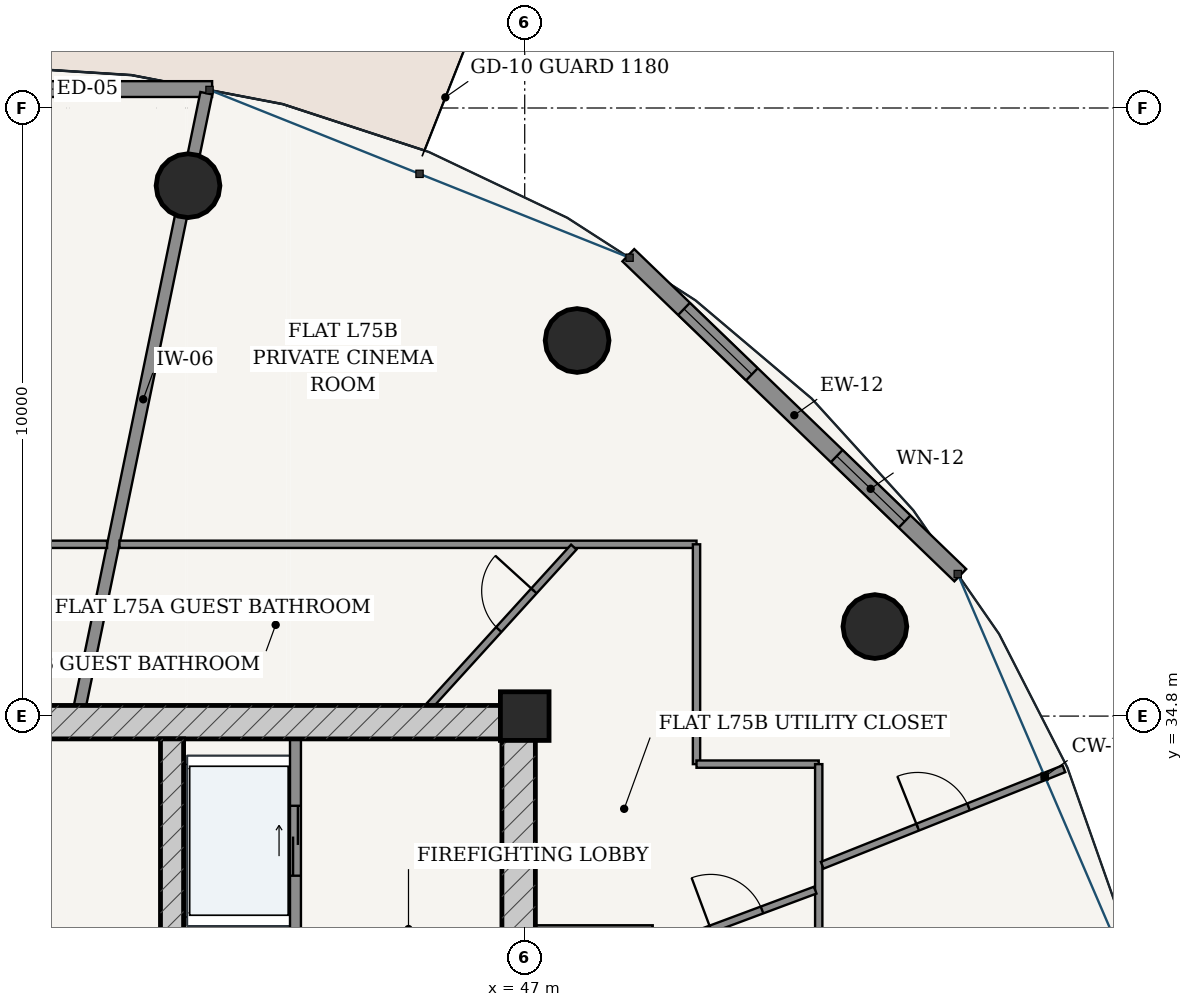
"""IFC4 building model, lengths in metres.
Left out: names, types, materials, properties, quantities, classifications, styles, units other than length and angle.
Written with IfcOpenShell. Run it as: python <this file> out.ifc"""

import sys

from ifc_helpers import new_model, si_unit, direction, frame, frame_2d, origin, origin_2d, place, context, subcontext, project, spatial, rectangle, hollow_circle, extrude, source, transform, mapped, element, fill, save


model = new_model("IFC4")
c1 = context("Model", 3, precision=1e-05, world=origin(), true_north=direction((-0.2419218956, 0.970295726276)))
c2 = subcontext(c1, "Body", "Model", "MODEL_VIEW")
j1 = project(units=[si_unit("LENGTHUNIT", "METRE"), si_unit("PLANEANGLEUNIT", "RADIAN")], contexts=[c1])
p1 = place(None, origin())
s1 = spatial("IfcSite", under=j1, at=p1, CompositionType="ELEMENT")
p2 = place(p1, origin())
s2 = spatial("IfcBuilding", under=s1, at=p2, CompositionType="ELEMENT")
p3 = place(p2, frame((0.0, 0.0, 285.7)))
s3 = spatial("IfcBuildingStorey", under=s2, at=p3, CompositionType="ELEMENT", Elevation=285.7)
p4 = place(p3, frame((47.0, 34.8, 0.0), z_axis=(0.0, 0.0, 1.0), x_axis=(1.0, 0.0, 0.0)))
e1 = element("IfcColumn", 1, at=p4, inside=s3, PredefinedType="COLUMN", context=c2, shape_type="SweptSolid", body=[
    extrude(rectangle(XDim=0.8, YDim=0.8, at=origin_2d()), origin(), (0.0, 0.0, 1.0), 3.75),
])
p5 = place(p3, frame((28.825, 34.7, 0.0), z_axis=(0.0, 0.0, 1.0), x_axis=(1.0, 0.0, 0.0)))
e2 = element("IfcWall", 2, at=p5, inside=s3, PredefinedType="SHEAR", context=c2, shape_type="SweptSolid", body=[
    extrude(rectangle(XDim=18.35, YDim=0.55, at=frame_2d((9.175, 0.0))), origin(), (0.0, 0.0, 1.0), 3.49),
])
p6 = place(p3, frame((46.9, 19.175, 0.0), z_axis=(0.0, 0.0, 1.0), x_axis=(0.0, 1.0, 0.0)))
e3 = element("IfcWall", 3, at=p6, inside=s3, PredefinedType="SHEAR", context=c2, shape_type="SweptSolid", body=[
    extrude(rectangle(XDim=15.25, YDim=0.55, at=frame_2d((7.625, 0.0))), origin(), (0.0, 0.0, 1.0), 3.49),
])
p7 = place(p6, frame((9.875, 0.0, 0.0)))
e4 = element("IfcOpeningElement", 4, at=p7, cuts=e3, PredefinedType="OPENING", context=c2, shape_type="SweptSolid", body=[
    extrude(rectangle(XDim=1.5, YDim=2.2, at=frame_2d((0.75, 1.1))), frame((0.0, 0.285, 0.0), z_axis=(0.0, -1.0, 0.0), x_axis=(1.0, 0.0, 0.0)), (0.0, 0.0, 1.0), 0.57),
])
p8 = place(p3, frame((41.2, 19.175, 0.0), z_axis=(0.0, 0.0, 1.0), x_axis=(0.0, 1.0, 0.0)))
e5 = element("IfcWall", 5, at=p8, inside=s3, PredefinedType="SHEAR", context=c2, shape_type="SweptSolid", body=[
    extrude(rectangle(XDim=15.25, YDim=0.38, at=frame_2d((7.625, 0.0))), origin(), (0.0, 0.0, 1.0), 3.49),
])
p9 = place(p8, frame((7.8, 0.0, 0.0)))
e6 = element("IfcOpeningElement", 6, at=p9, cuts=e5, PredefinedType="OPENING", context=c2, shape_type="SweptSolid", body=[
    extrude(rectangle(XDim=1.05, YDim=2.15, at=frame_2d((0.525, 1.075))), frame((0.0, 0.2, 0.0), z_axis=(0.0, -1.0, 0.0), x_axis=(1.0, 0.0, 0.0)), (0.0, 0.0, 1.0), 0.4),
])
for number, where, z_axis, x_axis in (
    (7, (52.759, 36.272, 0.0), (0.0, 0.0, 1.0), (1.0, 0.0, 0.0)),
    (8, (47.861, 40.977, 0.0), (0.0, 0.0, 1.0), (1.0, 0.0, 0.0)),
    (9, (41.463, 43.522, 0.0), (0.0, 0.0, 1.0), (1.0, 0.0, 0.0)),
):
    element("IfcColumn", number, at=place(p3, frame(where, z_axis=z_axis, x_axis=x_axis)), inside=s3, PredefinedType="COLUMN", context=c2, shape_type="SweptSolid", body=[
        extrude(hollow_circle(Radius=0.525, WallThickness=0.035, at=origin_2d()), origin(), (0.0, 0.0, 1.0), 3.75),
    ])
p10 = place(p3, frame((54.163, 37.117, 0.0), z_axis=(0.0, 0.0, 1.0), x_axis=(-0.719979309073, 0.693995529169, 0.0)))
e10 = element("IfcWall", 10, at=p10, inside=s3, PredefinedType="SOLIDWALL", context=c2, shape_type="SweptSolid", body=[
    extrude(rectangle(XDim=7.583, YDim=0.28, at=frame_2d((3.791, 0.0))), origin(), (0.0, 0.0, 1.0), 3.49),
])
p11 = place(p10, frame((1.272, 0.0, 0.85)))
e11 = element("IfcOpeningElement", 11, at=p11, cuts=e10, PredefinedType="OPENING", context=c2, shape_type="SweptSolid", body=[
    extrude(rectangle(XDim=1.55, YDim=1.95, at=frame_2d((0.775, 0.975))), frame((0.0, 0.15, 0.0), z_axis=(0.0, -1.0, 0.0), x_axis=(1.0, 0.0, 0.0)), (0.0, 0.0, 1.0), 0.3),
])
p12 = place(p10, frame((4.76, 0.0, 0.85)))
e12 = element("IfcOpeningElement", 12, at=p12, cuts=e10, PredefinedType="OPENING", context=c2, shape_type="SweptSolid", body=[
    extrude(rectangle(XDim=1.55, YDim=1.95, at=frame_2d((0.775, 0.975))), frame((0.0, 0.15, 0.0), z_axis=(0.0, -1.0, 0.0), x_axis=(1.0, 0.0, 0.0)), (0.0, 0.0, 1.0), 0.3),
])
p13 = place(p3, frame((41.859, 45.111, 0.0), z_axis=(0.0, 0.0, 1.0), x_axis=(-1.0, 0.0, 0.0)))
e13 = element("IfcWall", 13, at=p13, inside=s3, PredefinedType="SOLIDWALL", context=c2, shape_type="SweptSolid", body=[
    extrude(rectangle(XDim=7.718, YDim=0.26, at=frame_2d((3.859, 0.0))), origin(), (0.0, 0.0, 1.0), 3.49),
])
p14 = place(p13, frame((3.184, 0.0, 0.0)))
e14 = element("IfcOpeningElement", 14, at=p14, cuts=e13, PredefinedType="OPENING", context=c2, shape_type="SweptSolid", body=[
    extrude(rectangle(XDim=1.35, YDim=2.2, at=frame_2d((0.675, 1.1))), frame((0.0, 0.14, 0.0), z_axis=(0.0, -1.0, 0.0), x_axis=(1.0, 0.0, 0.0)), (0.0, 0.0, 1.0), 0.28),
])
p15 = place(p3, frame((43.23, 28.52, 0.0), z_axis=(0.0, 0.0, 1.0), x_axis=(0.0, 1.0, 0.0)))
e15 = element("IfcWall", 15, at=p15, inside=s3, PredefinedType="PARTITIONING", context=c2, shape_type="SweptSolid", body=[
    extrude(rectangle(XDim=5.905, YDim=0.18, at=frame_2d((2.953, 0.0))), origin(), (0.0, 0.0, 1.0), 3.49),
])
p16 = place(p15, frame((0.905, 0.0, 0.0)))
e16 = element("IfcOpeningElement", 16, at=p16, cuts=e15, PredefinedType="OPENING", context=c2, shape_type="SweptSolid", body=[
    extrude(rectangle(XDim=0.85, YDim=2.1, at=frame_2d((0.425, 1.05))), frame((0.0, 0.1, 0.0), z_axis=(0.0, -1.0, 0.0), x_axis=(1.0, 0.0, 0.0)), (0.0, 0.0, 1.0), 0.2),
])
p17 = place(p15, frame((3.655, 0.0, 0.0)))
e17 = element("IfcOpeningElement", 17, at=p17, cuts=e15, PredefinedType="OPENING", context=c2, shape_type="SweptSolid", body=[
    extrude(rectangle(XDim=1.15, YDim=2.2, at=frame_2d((0.575, 1.1))), frame((0.0, 0.1, 0.0), z_axis=(0.0, -1.0, 0.0), x_axis=(1.0, 0.0, 0.0)), (0.0, 0.0, 1.0), 0.2),
])
p18 = place(p3, frame((47.175, 31.28, 0.0), z_axis=(0.0, 0.0, 1.0), x_axis=(1.0, 0.0, 0.0)))
e18 = element("IfcWall", 18, at=p18, inside=s3, PredefinedType="PARTITIONING", context=c2, shape_type="SweptSolid", body=[
    extrude(rectangle(XDim=1.93, YDim=0.16, at=frame_2d((0.965, 0.0))), origin(), (0.0, 0.0, 1.0), 3.49),
])
p19 = place(p3, frame((39.688, 34.977, 0.0), z_axis=(0.0, 0.0, 1.0), x_axis=(0.202091890364, 0.979366564596, 0.0)))
e19 = element("IfcWall", 19, at=p19, inside=s3, PredefinedType="PARTITIONING", context=c2, shape_type="SweptSolid", body=[
    extrude(rectangle(XDim=10.278, YDim=0.2, at=frame_2d((5.139, 0.0))), origin(), (0.0, 0.0, 1.0), 2.575),
])
p20 = place(p3, frame((26.175, 37.625, 0.0), z_axis=(0.0, 0.0, 1.0), x_axis=(1.0, 0.0, 0.0)))
e20 = element("IfcWall", 20, at=p20, inside=s3, PredefinedType="PARTITIONING", context=c2, shape_type="SweptSolid", body=[
    extrude(rectangle(XDim=13.957, YDim=0.12, at=frame_2d((6.979, 0.0))), origin(), (0.0, 0.0, 1.0), 3.015),
])
p21 = place(p20, frame((10.852, 0.0, 0.0)))
e21 = element("IfcOpeningElement", 21, at=p21, cuts=e20, PredefinedType="OPENING", context=c2, shape_type="SweptSolid", body=[
    extrude(rectangle(XDim=0.86, YDim=2.15, at=frame_2d((0.43, 1.075))), frame((0.0, 0.07, 0.0), z_axis=(0.0, -1.0, 0.0), x_axis=(1.0, 0.0, 0.0)), (0.0, 0.0, 1.0), 0.14),
])
p22 = place(p20, frame((4.183, 0.0, 0.0)))
e22 = element("IfcOpeningElement", 22, at=p22, cuts=e20, PredefinedType="OPENING", context=c2, shape_type="SweptSolid", body=[
    extrude(rectangle(XDim=0.9, YDim=2.15, at=frame_2d((0.45, 1.075))), frame((0.0, 0.07, 0.0), z_axis=(0.0, -1.0, 0.0), x_axis=(1.0, 0.0, 0.0)), (0.0, 0.0, 1.0), 0.14),
])
p23 = place(p3, frame((40.336, 37.625, 0.0), z_axis=(0.0, 0.0, 1.0), x_axis=(1.0, 0.0, 0.0)))
e23 = element("IfcWall", 23, at=p23, inside=s3, PredefinedType="PARTITIONING", context=c2, shape_type="SweptSolid", body=[
    extrude(rectangle(XDim=9.489, YDim=0.12, at=frame_2d((4.745, 0.0))), origin(), (0.0, 0.0, 1.0), 3.015),
])
p24 = place(p3, frame((49.825, 37.625, 0.0), z_axis=(0.0, 0.0, 1.0), x_axis=(0.0, -1.0, 0.0)))
e24 = element("IfcWall", 24, at=p24, inside=s3, PredefinedType="PARTITIONING", context=c2, shape_type="SweptSolid", body=[
    extrude(rectangle(XDim=3.615, YDim=0.12, at=frame_2d((1.808, 0.0))), origin(), (0.0, 0.0, 1.0), 3.015),
])
p25 = place(p3, frame((49.825, 34.01, 0.0), z_axis=(0.0, 0.0, 1.0), x_axis=(1.0, 0.0, 0.0)))
e25 = element("IfcWall", 25, at=p25, inside=s3, PredefinedType="PARTITIONING", context=c2, shape_type="SweptSolid", body=[
    extrude(rectangle(XDim=2.01, YDim=0.12, at=frame_2d((1.005, 0.0))), origin(), (0.0, 0.0, 1.0), 3.209),
])
p26 = place(p3, frame((51.835, 34.01, 0.0), z_axis=(0.0, 0.0, 1.0), x_axis=(0.0, -1.0, 0.0)))
e26 = element("IfcWall", 26, at=p26, inside=s3, PredefinedType="PARTITIONING", context=c2, shape_type="SweptSolid", body=[
    extrude(rectangle(XDim=19.545, YDim=0.12, at=frame_2d((9.772, 0.0))), origin(), (0.0, 0.0, 1.0), 3.015),
])
p27 = place(p26, frame((14.768, 0.0, 0.0)))
e27 = element("IfcOpeningElement", 27, at=p27, cuts=e26, PredefinedType="OPENING", context=c2, shape_type="SweptSolid", body=[
    extrude(rectangle(XDim=0.9, YDim=2.15, at=frame_2d((0.45, 1.075))), frame((0.0, 0.07, 0.0), z_axis=(0.0, -1.0, 0.0), x_axis=(1.0, 0.0, 0.0)), (0.0, 0.0, 1.0), 0.14),
])
p28 = place(p26, frame((8.718, 0.0, 0.0)))
e28 = element("IfcOpeningElement", 28, at=p28, cuts=e26, PredefinedType="OPENING", context=c2, shape_type="SweptSolid", body=[
    extrude(rectangle(XDim=0.9, YDim=2.15, at=frame_2d((0.45, 1.075))), frame((0.0, 0.07, 0.0), z_axis=(0.0, -1.0, 0.0), x_axis=(1.0, 0.0, 0.0)), (0.0, 0.0, 1.0), 0.14),
])
p29 = place(p26, frame((4.14, 0.0, 0.0)))
e29 = element("IfcOpeningElement", 29, at=p29, cuts=e26, PredefinedType="OPENING", context=c2, shape_type="SweptSolid", body=[
    extrude(rectangle(XDim=0.9, YDim=2.15, at=frame_2d((0.45, 1.075))), frame((0.0, 0.07, 0.0), z_axis=(0.0, -1.0, 0.0), x_axis=(1.0, 0.0, 0.0)), (0.0, 0.0, 1.0), 0.14),
])
p30 = place(p3, frame((51.893, 32.347, 0.0), z_axis=(0.0, 0.0, 1.0), x_axis=(0.928712556691, 0.370800467966, 0.0)))
e30 = element("IfcWall", 30, at=p30, inside=s3, PredefinedType="PARTITIONING", context=c2, shape_type="SweptSolid", body=[
    extrude(rectangle(XDim=4.28, YDim=0.12, at=frame_2d((2.14, 0.0))), origin(), (0.0, 0.0, 1.0), 3.121),
])
p31 = place(p30, frame((1.69, 0.0, 0.0)))
e31 = element("IfcOpeningElement", 31, at=p31, cuts=e30, PredefinedType="OPENING", context=c2, shape_type="SweptSolid", body=[
    extrude(rectangle(XDim=0.9, YDim=2.15, at=frame_2d((0.45, 1.075))), frame((0.0, 0.07, 0.0), z_axis=(0.0, -1.0, 0.0), x_axis=(1.0, 0.0, 0.0)), (0.0, 0.0, 1.0), 0.14),
])
p32 = place(p3, frame((49.185, 30.971, 0.0), z_axis=(0.0, 0.0, 1.0), x_axis=(0.93696600231, 0.349420535338, 0.0)))
e32 = element("IfcWall", 32, at=p32, inside=s3, PredefinedType="PARTITIONING", context=c2, shape_type="SweptSolid", body=[
    extrude(rectangle(XDim=2.766, YDim=0.12, at=frame_2d((1.383, 0.0))), origin(), (0.0, 0.0, 1.0), 3.209),
])
p33 = place(p32, frame((0.933, 0.0, 0.0)))
e33 = element("IfcOpeningElement", 33, at=p33, cuts=e32, PredefinedType="OPENING", context=c2, shape_type="SweptSolid", body=[
    extrude(rectangle(XDim=0.9, YDim=2.15, at=frame_2d((0.45, 1.075))), frame((0.0, 0.07, 0.0), z_axis=(0.0, -1.0, 0.0), x_axis=(1.0, 0.0, 0.0)), (0.0, 0.0, 1.0), 0.14),
])
p34 = place(p3, frame((45.439, 34.977, 0.0), z_axis=(0.0, 0.0, 1.0), x_axis=(0.672980108938, 0.739660579573, 0.0)))
e34 = element("IfcWall", 34, at=p34, inside=s3, PredefinedType="PARTITIONING", context=c2, shape_type="SweptSolid", body=[
    extrude(rectangle(XDim=3.519, YDim=0.12, at=frame_2d((1.759, 0.0))), origin(), (0.0, 0.0, 1.0), 3.015),
])
p35 = place(p34, frame((1.685, 0.0, 0.0)))
e35 = element("IfcOpeningElement", 35, at=p35, cuts=e34, PredefinedType="OPENING", context=c2, shape_type="SweptSolid", body=[
    extrude(rectangle(XDim=0.86, YDim=2.15, at=frame_2d((0.43, 1.075))), frame((0.0, 0.07, 0.0), z_axis=(0.0, -1.0, 0.0), x_axis=(1.0, 0.0, 0.0)), (0.0, 0.0, 1.0), 0.14),
])
m1 = source(origin(), c2, "Body", "SweptSolid", [
    extrude(rectangle(XDim=1.55, YDim=1.95, at=frame_2d((0.775, 0.975))), frame((0.0, 0.03, 0.0), z_axis=(0.0, -1.0, 0.0), x_axis=(1.0, 0.0, 0.0)), (0.0, 0.0, 1.0), 0.06),
])
p36 = place(p11, origin())
e36 = element("IfcWindow", 36, at=p36, inside=s3, PartitioningType="SINGLE_PANEL", PredefinedType="WINDOW", context=c2, shape_type="MappedRepresentation", body=[
    mapped(m1, transform((0.0, 0.0, 0.0), scale=1.0)),
])
fill(e11, e36)
p37 = place(p12, origin())
e37 = element("IfcWindow", 37, at=p37, inside=s3, PartitioningType="SINGLE_PANEL", PredefinedType="WINDOW", context=c2, shape_type="MappedRepresentation", body=[
    mapped(m1, transform((0.0, 0.0, 0.0), scale=1.0)),
])
fill(e12, e37)
m2 = source(origin(), c2, "Body", "SweptSolid", [
    extrude(rectangle(XDim=1.15, YDim=2.2, at=frame_2d((0.575, 1.1))), frame((0.0, 0.025, 0.0), z_axis=(0.0, -1.0, 0.0), x_axis=(1.0, 0.0, 0.0)), (0.0, 0.0, 1.0), 0.05),
])
p38 = place(p17, origin())
e38 = element("IfcDoor", 38, at=p38, inside=s3, OperationType="DOUBLE_DOOR_SLIDING", PredefinedType="DOOR", context=c2, shape_type="MappedRepresentation", body=[
    mapped(m2, transform((0.0, 0.0, 0.0), scale=1.0)),
])
fill(e17, e38)
m3 = source(origin(), c2, "Body", "SweptSolid", [
    extrude(rectangle(XDim=0.9, YDim=2.15, at=frame_2d((0.45, 1.075))), frame((0.0, 0.025, 0.0), z_axis=(0.0, -1.0, 0.0), x_axis=(1.0, 0.0, 0.0)), (0.0, 0.0, 1.0), 0.05),
])
p39 = place(p33, origin())
e39 = element("IfcDoor", 39, at=p39, inside=s3, OperationType="SINGLE_SWING_LEFT", PredefinedType="DOOR", context=c2, shape_type="MappedRepresentation", body=[
    mapped(m3, transform((0.0, 0.0, 0.0), scale=1.0)),
])
fill(e33, e39)
m4 = source(origin(), c2, "Body", "SweptSolid", [
    extrude(rectangle(XDim=0.86, YDim=2.15, at=frame_2d((0.43, 1.075))), frame((0.0, 0.025, 0.0), z_axis=(0.0, -1.0, 0.0), x_axis=(1.0, 0.0, 0.0)), (0.0, 0.0, 1.0), 0.05),
])
p40 = place(p35, origin())
e40 = element("IfcDoor", 40, at=p40, inside=s3, OperationType="SINGLE_SWING_RIGHT", PredefinedType="DOOR", context=c2, shape_type="MappedRepresentation", body=[
    mapped(m4, transform((0.0, 0.0, 0.0), scale=1.0)),
])
fill(e35, e40)
p41 = place(p31, origin())
e41 = element("IfcDoor", 41, at=p41, inside=s3, OperationType="SINGLE_SWING_LEFT", PredefinedType="DOOR", context=c2, shape_type="MappedRepresentation", body=[
    mapped(m3, transform((0.0, 0.0, 0.0), scale=1.0)),
])
fill(e31, e41)
save(model, sys.argv[1])
